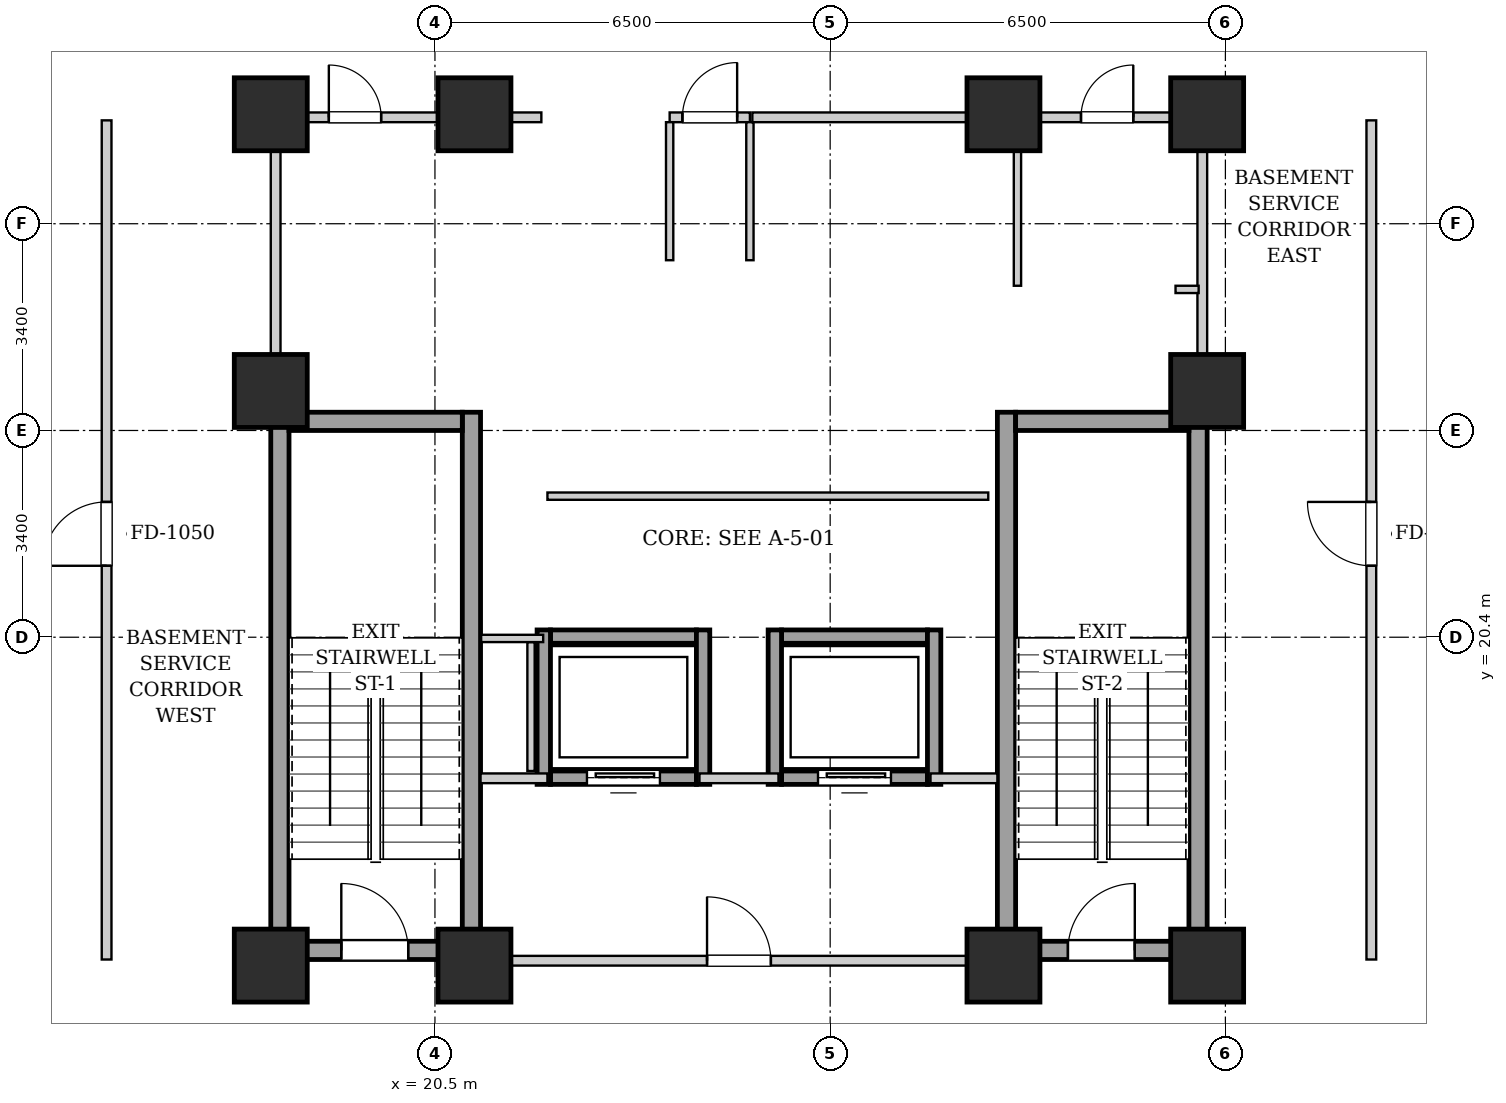
"""IFC4 building model, lengths in metres.
Left out: names, types, materials, properties, quantities, classifications, styles, units other than length and angle.
Written with IfcOpenShell. Run it as: python <this file> out.ifc"""

import sys

from ifc_helpers import new_model, si_unit, direction, frame, frame_2d, origin, origin_2d, place, context, subcontext, project, spatial, rectangle, extrude, element, fill, save


model = new_model("IFC4")
c1 = context("Model", 3, precision=1e-05, world=origin(), true_north=direction((0.0, 1.0)))
c2 = subcontext(c1, "Body", "Model", "MODEL_VIEW")
j1 = project(units=[si_unit("LENGTHUNIT", "METRE"), si_unit("PLANEANGLEUNIT", "RADIAN")], contexts=[c1])
p1 = place(None, origin())
s1 = spatial("IfcSite", under=j1, at=p1, CompositionType="ELEMENT")
p2 = place(p1, origin())
s2 = spatial("IfcBuilding", under=s1, at=p2, CompositionType="ELEMENT")
p3 = place(p2, frame((0.0, 0.0, -9.6)))
s3 = spatial("IfcBuildingStorey", under=s2, at=p3, CompositionType="ELEMENT", Elevation=-9.6)
for number, where, z_axis, x_axis in (
    (1, (17.8, 15.0, 0.0), (0.0, 0.0, 1.0), (1.0, 0.0, 0.0)),
    (2, (21.15, 15.0, 0.0), (0.0, 0.0, 1.0), (1.0, 0.0, 0.0)),
    (3, (29.85, 15.0, 0.0), (0.0, 0.0, 1.0), (1.0, 0.0, 0.0)),
    (4, (33.2, 15.0, 0.0), (0.0, 0.0, 1.0), (1.0, 0.0, 0.0)),
    (5, (17.8, 29.0, 0.0), (0.0, 0.0, 1.0), (1.0, 0.0, 0.0)),
    (6, (21.15, 29.0, 0.0), (0.0, 0.0, 1.0), (1.0, 0.0, 0.0)),
    (7, (29.85, 29.0, 0.0), (0.0, 0.0, 1.0), (1.0, 0.0, 0.0)),
    (8, (33.2, 29.0, 0.0), (0.0, 0.0, 1.0), (1.0, 0.0, 0.0)),
    (9, (17.8, 24.45, 0.0), (0.0, 0.0, 1.0), (1.0, 0.0, 0.0)),
    (10, (33.2, 24.45, 0.0), (0.0, 0.0, 1.0), (1.0, 0.0, 0.0)),
):
    element("IfcColumn", number, at=place(p3, frame(where, z_axis=z_axis, x_axis=x_axis)), inside=s3, PredefinedType="COLUMN", context=c2, shape_type="SweptSolid", body=[
        extrude(rectangle(XDim=1.2, YDim=1.2, at=origin_2d()), origin(), (0.0, 0.0, 1.0), 4.8),
    ])
for number, where, z_axis, x_axis in (
    (11, (17.95, 15.1, 0.0), (0.0, 0.0, 1.0), (0.0, 1.0, 0.0)),
    (12, (21.1, 15.1, 0.0), (0.0, 0.0, 1.0), (0.0, 1.0, 0.0)),
):
    element("IfcWall", number, at=place(p3, frame(where, z_axis=z_axis, x_axis=x_axis)), inside=s3, PredefinedType="SHEAR", context=c2, shape_type="SweptSolid", body=[
        extrude(rectangle(XDim=9.0, YDim=0.3, at=frame_2d((4.5, 0.0))), origin(), (0.0, 0.0, 1.0), 4.48),
    ])
p4 = place(p3, frame((18.1, 23.95, 0.0), z_axis=(0.0, 0.0, 1.0), x_axis=(1.0, 0.0, 0.0)))
e13 = element("IfcWall", 13, at=p4, inside=s3, PredefinedType="SHEAR", context=c2, shape_type="SweptSolid", body=[
    extrude(rectangle(XDim=2.85, YDim=0.3, at=frame_2d((1.425, 0.0))), origin(), (0.0, 0.0, 1.0), 4.48),
])
p5 = place(p3, frame((18.1, 15.25, 0.0), z_axis=(0.0, 0.0, 1.0), x_axis=(1.0, 0.0, 0.0)))
e14 = element("IfcWall", 14, at=p5, inside=s3, PredefinedType="SHEAR", context=c2, shape_type="SweptSolid", body=[
    extrude(rectangle(XDim=2.85, YDim=0.3, at=frame_2d((1.425, 0.0))), origin(), (0.0, 0.0, 1.0), 4.48),
])
p6 = place(p5, frame((0.86, 0.0, 0.0)))
e15 = element("IfcOpeningElement", 15, at=p6, cuts=e14, PredefinedType="OPENING", context=c2, shape_type="SweptSolid", body=[
    extrude(rectangle(XDim=1.1, YDim=2.05, at=frame_2d((0.55, 1.025))), frame((0.0, 0.16, 0.0), z_axis=(0.0, -1.0, 0.0), x_axis=(1.0, 0.0, 0.0)), (0.0, 0.0, 1.0), 0.32),
])
for number, where, z_axis, x_axis in (
    (16, (29.9, 15.1, 0.0), (0.0, 0.0, 1.0), (0.0, 1.0, 0.0)),
    (17, (33.05, 15.1, 0.0), (0.0, 0.0, 1.0), (0.0, 1.0, 0.0)),
):
    element("IfcWall", number, at=place(p3, frame(where, z_axis=z_axis, x_axis=x_axis)), inside=s3, PredefinedType="SHEAR", context=c2, shape_type="SweptSolid", body=[
        extrude(rectangle(XDim=9.0, YDim=0.3, at=frame_2d((4.5, 0.0))), origin(), (0.0, 0.0, 1.0), 4.48),
    ])
p7 = place(p3, frame((30.05, 23.95, 0.0), z_axis=(0.0, 0.0, 1.0), x_axis=(1.0, 0.0, 0.0)))
e18 = element("IfcWall", 18, at=p7, inside=s3, PredefinedType="SHEAR", context=c2, shape_type="SweptSolid", body=[
    extrude(rectangle(XDim=2.85, YDim=0.3, at=frame_2d((1.425, 0.0))), origin(), (0.0, 0.0, 1.0), 4.48),
])
p8 = place(p3, frame((30.05, 15.25, 0.0), z_axis=(0.0, 0.0, 1.0), x_axis=(1.0, 0.0, 0.0)))
e19 = element("IfcWall", 19, at=p8, inside=s3, PredefinedType="SHEAR", context=c2, shape_type="SweptSolid", body=[
    extrude(rectangle(XDim=2.85, YDim=0.3, at=frame_2d((1.425, 0.0))), origin(), (0.0, 0.0, 1.0), 4.48),
])
p9 = place(p8, frame((0.86, 0.0, 0.0)))
e20 = element("IfcOpeningElement", 20, at=p9, cuts=e19, PredefinedType="OPENING", context=c2, shape_type="SweptSolid", body=[
    extrude(rectangle(XDim=1.1, YDim=2.05, at=frame_2d((0.55, 1.025))), frame((0.0, 0.16, 0.0), z_axis=(0.0, -1.0, 0.0), x_axis=(1.0, 0.0, 0.0)), (0.0, 0.0, 1.0), 0.32),
])
p10 = place(p3, frame((22.4, 18.09, 0.0), z_axis=(0.0, 0.0, 1.0), x_axis=(1.0, 0.0, 0.0)))
e21 = element("IfcWall", 21, at=p10, inside=s3, PredefinedType="SHEAR", context=c2, shape_type="SweptSolid", body=[
    extrude(rectangle(XDim=2.4, YDim=0.22, at=frame_2d((1.2, 0.0))), origin(), (0.0, 0.0, 1.0), 4.48),
])
p11 = place(p10, frame((0.6, 0.0, 0.0)))
e22 = element("IfcOpeningElement", 22, at=p11, cuts=e21, PredefinedType="OPENING", context=c2, shape_type="SweptSolid", body=[
    extrude(rectangle(XDim=1.2, YDim=2.15, at=frame_2d((0.6, 1.075))), frame((0.0, 0.12, 0.0), z_axis=(0.0, -1.0, 0.0), x_axis=(1.0, 0.0, 0.0)), (0.0, 0.0, 1.0), 0.24),
])
p12 = place(p3, frame((22.4, 20.41, 0.0), z_axis=(0.0, 0.0, 1.0), x_axis=(1.0, 0.0, 0.0)))
e23 = element("IfcWall", 23, at=p12, inside=s3, PredefinedType="SHEAR", context=c2, shape_type="SweptSolid", body=[
    extrude(rectangle(XDim=2.4, YDim=0.22, at=frame_2d((1.2, 0.0))), origin(), (0.0, 0.0, 1.0), 4.48),
])
for number, where, z_axis, x_axis in (
    (24, (22.29, 17.98, 0.0), (0.0, 0.0, 1.0), (0.0, 1.0, 0.0)),
    (25, (24.91, 17.98, 0.0), (0.0, 0.0, 1.0), (0.0, 1.0, 0.0)),
):
    element("IfcWall", number, at=place(p3, frame(where, z_axis=z_axis, x_axis=x_axis)), inside=s3, PredefinedType="SHEAR", context=c2, shape_type="SweptSolid", body=[
        extrude(rectangle(XDim=2.54, YDim=0.22, at=frame_2d((1.27, 0.0))), origin(), (0.0, 0.0, 1.0), 4.48),
    ])
p13 = place(p3, frame((26.2, 18.09, 0.0), z_axis=(0.0, 0.0, 1.0), x_axis=(1.0, 0.0, 0.0)))
e26 = element("IfcWall", 26, at=p13, inside=s3, PredefinedType="SHEAR", context=c2, shape_type="SweptSolid", body=[
    extrude(rectangle(XDim=2.4, YDim=0.22, at=frame_2d((1.2, 0.0))), origin(), (0.0, 0.0, 1.0), 4.48),
])
p14 = place(p13, frame((0.6, 0.0, 0.0)))
e27 = element("IfcOpeningElement", 27, at=p14, cuts=e26, PredefinedType="OPENING", context=c2, shape_type="SweptSolid", body=[
    extrude(rectangle(XDim=1.2, YDim=2.15, at=frame_2d((0.6, 1.075))), frame((0.0, 0.12, 0.0), z_axis=(0.0, -1.0, 0.0), x_axis=(1.0, 0.0, 0.0)), (0.0, 0.0, 1.0), 0.24),
])
p15 = place(p3, frame((26.2, 20.41, 0.0), z_axis=(0.0, 0.0, 1.0), x_axis=(1.0, 0.0, 0.0)))
e28 = element("IfcWall", 28, at=p15, inside=s3, PredefinedType="SHEAR", context=c2, shape_type="SweptSolid", body=[
    extrude(rectangle(XDim=2.4, YDim=0.22, at=frame_2d((1.2, 0.0))), origin(), (0.0, 0.0, 1.0), 4.48),
])
for number, where, z_axis, x_axis in (
    (29, (26.09, 17.98, 0.0), (0.0, 0.0, 1.0), (0.0, 1.0, 0.0)),
    (30, (28.71, 17.98, 0.0), (0.0, 0.0, 1.0), (0.0, 1.0, 0.0)),
):
    element("IfcWall", number, at=place(p3, frame(where, z_axis=z_axis, x_axis=x_axis)), inside=s3, PredefinedType="SHEAR", context=c2, shape_type="SweptSolid", body=[
        extrude(rectangle(XDim=2.54, YDim=0.22, at=frame_2d((1.27, 0.0))), origin(), (0.0, 0.0, 1.0), 4.48),
    ])
p16 = place(p3, frame((21.25, 15.08, 0.0), z_axis=(0.0, 0.0, 1.0), x_axis=(1.0, 0.0, 0.0)))
e31 = element("IfcWall", 31, at=p16, inside=s3, PredefinedType="PARTITIONING", context=c2, shape_type="SweptSolid", body=[
    extrude(rectangle(XDim=8.5, YDim=0.16, at=frame_2d((4.25, 0.0))), origin(), (0.0, 0.0, 1.0), 4.48),
])
p17 = place(p16, frame((3.725, 0.0, 0.0)))
e32 = element("IfcOpeningElement", 32, at=p17, cuts=e31, PredefinedType="OPENING", context=c2, shape_type="SweptSolid", body=[
    extrude(rectangle(XDim=1.05, YDim=2.05, at=frame_2d((0.525, 1.025))), frame((0.0, 0.09, 0.0), z_axis=(0.0, -1.0, 0.0), x_axis=(1.0, 0.0, 0.0)), (0.0, 0.0, 1.0), 0.18),
])
p18 = place(p3, frame((21.25, 18.08, 0.0), z_axis=(0.0, 0.0, 1.0), x_axis=(1.0, 0.0, 0.0)))
e33 = element("IfcWall", 33, at=p18, inside=s3, PredefinedType="PARTITIONING", context=c2, shape_type="SweptSolid", body=[
    extrude(rectangle(XDim=1.1, YDim=0.16, at=frame_2d((0.55, 0.0))), origin(), (0.0, 0.0, 1.0), 4.48),
])
p19 = place(p3, frame((24.85, 18.08, 0.0), z_axis=(0.0, 0.0, 1.0), x_axis=(1.0, 0.0, 0.0)))
e34 = element("IfcWall", 34, at=p19, inside=s3, PredefinedType="PARTITIONING", context=c2, shape_type="SweptSolid", body=[
    extrude(rectangle(XDim=1.3, YDim=0.16, at=frame_2d((0.65, 0.0))), origin(), (0.0, 0.0, 1.0), 4.48),
])
p20 = place(p3, frame((28.65, 18.08, 0.0), z_axis=(0.0, 0.0, 1.0), x_axis=(1.0, 0.0, 0.0)))
e35 = element("IfcWall", 35, at=p20, inside=s3, PredefinedType="PARTITIONING", context=c2, shape_type="SweptSolid", body=[
    extrude(rectangle(XDim=1.1, YDim=0.16, at=frame_2d((0.55, 0.0))), origin(), (0.0, 0.0, 1.0), 4.48),
])
for number, where, z_axis, x_axis in (
    (36, (17.88, 24.12, 0.0), (0.0, 0.0, 1.0), (0.0, 1.0, 0.0)),
    (37, (33.12, 24.12, 0.0), (0.0, 0.0, 1.0), (0.0, 1.0, 0.0)),
):
    element("IfcWall", number, at=place(p3, frame(where, z_axis=z_axis, x_axis=x_axis)), inside=s3, PredefinedType="PARTITIONING", context=c2, shape_type="SweptSolid", body=[
        extrude(rectangle(XDim=4.76, YDim=0.16, at=frame_2d((2.38, 0.0))), origin(), (0.0, 0.0, 1.0), 4.48),
    ])
p21 = place(p3, frame((24.36, 28.95, 0.0), z_axis=(0.0, 0.0, 1.0), x_axis=(1.0, 0.0, 0.0)))
e38 = element("IfcWall", 38, at=p21, inside=s3, PredefinedType="PARTITIONING", context=c2, shape_type="SweptSolid", body=[
    extrude(rectangle(XDim=1.32, YDim=0.16, at=frame_2d((0.66, 0.0))), origin(), (0.0, 0.0, 1.0), 4.48),
])
p22 = place(p21, frame((0.21, 0.0, 0.0)))
e39 = element("IfcOpeningElement", 39, at=p22, cuts=e38, PredefinedType="OPENING", context=c2, shape_type="SweptSolid", body=[
    extrude(rectangle(XDim=0.9, YDim=2.05, at=frame_2d((0.45, 1.025))), frame((0.0, 0.09, 0.0), z_axis=(0.0, -1.0, 0.0), x_axis=(1.0, 0.0, 0.0)), (0.0, 0.0, 1.0), 0.18),
])
p23 = place(p3, frame((17.96, 28.95, 0.0), z_axis=(0.0, 0.0, 1.0), x_axis=(1.0, 0.0, 0.0)))
e40 = element("IfcWall", 40, at=p23, inside=s3, PredefinedType="PARTITIONING", context=c2, shape_type="SweptSolid", body=[
    extrude(rectangle(XDim=4.29, YDim=0.16, at=frame_2d((2.145, 0.0))), origin(), (0.0, 0.0, 1.0), 4.48),
])
p24 = place(p23, frame((0.795, 0.0, 0.0)))
e41 = element("IfcOpeningElement", 41, at=p24, cuts=e40, PredefinedType="OPENING", context=c2, shape_type="SweptSolid", body=[
    extrude(rectangle(XDim=0.86, YDim=2.05, at=frame_2d((0.43, 1.025))), frame((0.0, 0.09, 0.0), z_axis=(0.0, -1.0, 0.0), x_axis=(1.0, 0.0, 0.0)), (0.0, 0.0, 1.0), 0.18),
])
p25 = place(p3, frame((22.08, 18.2, 0.0), z_axis=(0.0, 0.0, 1.0), x_axis=(0.0, 1.0, 0.0)))
e42 = element("IfcWall", 42, at=p25, inside=s3, PredefinedType="PARTITIONING", context=c2, shape_type="SweptSolid", body=[
    extrude(rectangle(XDim=2.12, YDim=0.12, at=frame_2d((1.06, 0.0))), origin(), (0.0, 0.0, 1.0), 4.48),
])
p26 = place(p3, frame((22.28, 20.38, 0.0), z_axis=(0.0, 0.0, 1.0), x_axis=(-1.0, 0.0, 0.0)))
e43 = element("IfcWall", 43, at=p26, inside=s3, PredefinedType="PARTITIONING", context=c2, shape_type="SweptSolid", body=[
    extrude(rectangle(XDim=1.02, YDim=0.12, at=frame_2d((0.51, 0.0))), origin(), (0.0, 0.0, 1.0), 4.48),
])
for number, where, z_axis, x_axis in (
    (44, (24.36, 26.6, 0.0), (0.0, 0.0, 1.0), (0.0, 1.0, 0.0)),
    (45, (25.68, 26.6, 0.0), (0.0, 0.0, 1.0), (0.0, 1.0, 0.0)),
):
    element("IfcWall", number, at=place(p3, frame(where, z_axis=z_axis, x_axis=x_axis)), inside=s3, PredefinedType="PARTITIONING", context=c2, shape_type="SweptSolid", body=[
        extrude(rectangle(XDim=2.27, YDim=0.12, at=frame_2d((1.135, 0.0))), origin(), (0.0, 0.0, 1.0), 4.48),
    ])
p27 = place(p3, frame((30.08, 26.18, 0.0), z_axis=(0.0, 0.0, 1.0), x_axis=(0.0, 1.0, 0.0)))
e46 = element("IfcWall", 46, at=p27, inside=s3, PredefinedType="PARTITIONING", context=c2, shape_type="SweptSolid", body=[
    extrude(rectangle(XDim=2.68, YDim=0.12, at=frame_2d((1.34, 0.0))), origin(), (0.0, 0.0, 1.0), 4.48),
])
p28 = place(p3, frame((32.68, 26.12, 0.0), z_axis=(0.0, 0.0, 1.0), x_axis=(1.0, 0.0, 0.0)))
e47 = element("IfcWall", 47, at=p28, inside=s3, PredefinedType="PARTITIONING", context=c2, shape_type="SweptSolid", body=[
    extrude(rectangle(XDim=0.38, YDim=0.12, at=frame_2d((0.19, 0.0))), origin(), (0.0, 0.0, 1.0), 4.48),
])
p29 = place(p3, frame((30.08, 28.95, 0.0), z_axis=(0.0, 0.0, 1.0), x_axis=(1.0, 0.0, 0.0)))
e48 = element("IfcWall", 48, at=p29, inside=s3, PredefinedType="PARTITIONING", context=c2, shape_type="SweptSolid", body=[
    extrude(rectangle(XDim=2.96, YDim=0.16, at=frame_2d((1.48, 0.0))), origin(), (0.0, 0.0, 1.0), 4.48),
])
p30 = place(p29, frame((1.045, 0.0, 0.0)))
e49 = element("IfcOpeningElement", 49, at=p30, cuts=e48, PredefinedType="OPENING", context=c2, shape_type="SweptSolid", body=[
    extrude(rectangle(XDim=0.86, YDim=2.05, at=frame_2d((0.43, 1.025))), frame((0.0, 0.09, 0.0), z_axis=(0.0, -1.0, 0.0), x_axis=(1.0, 0.0, 0.0)), (0.0, 0.0, 1.0), 0.18),
])
p31 = place(p3, frame((25.72, 28.95, 0.0), z_axis=(0.0, 0.0, 1.0), x_axis=(1.0, 0.0, 0.0)))
e50 = element("IfcWall", 50, at=p31, inside=s3, PredefinedType="PARTITIONING", context=c2, shape_type="SweptSolid", body=[
    extrude(rectangle(XDim=4.3, YDim=0.16, at=frame_2d((2.15, 0.0))), origin(), (0.0, 0.0, 1.0), 4.48),
])
p32 = place(p3, frame((22.35, 22.72, 0.0), z_axis=(0.0, 0.0, 1.0), x_axis=(1.0, 0.0, 0.0)))
e51 = element("IfcWall", 51, at=p32, inside=s3, PredefinedType="PARTITIONING", context=c2, shape_type="SweptSolid", body=[
    extrude(rectangle(XDim=7.25, YDim=0.12, at=frame_2d((3.625, 0.0))), origin(), (0.0, 0.0, 1.0), 4.48),
])
p33 = place(p3, frame((15.1, 15.1, 0.0), z_axis=(0.0, 0.0, 1.0), x_axis=(0.0, 1.0, 0.0)))
e52 = element("IfcWall", 52, at=p33, inside=s3, PredefinedType="PARTITIONING", context=c2, shape_type="SweptSolid", body=[
    extrude(rectangle(XDim=13.8, YDim=0.16, at=frame_2d((6.9, 0.0))), origin(), (0.0, 0.0, 1.0), 4.48),
])
p34 = place(p33, frame((6.475, 0.0, 0.0)))
e53 = element("IfcOpeningElement", 53, at=p34, cuts=e52, PredefinedType="OPENING", context=c2, shape_type="SweptSolid", body=[
    extrude(rectangle(XDim=1.05, YDim=2.05, at=frame_2d((0.525, 1.025))), frame((0.0, 0.09, 0.0), z_axis=(0.0, -1.0, 0.0), x_axis=(1.0, 0.0, 0.0)), (0.0, 0.0, 1.0), 0.18),
])
p35 = place(p3, frame((35.9, 15.1, 0.0), z_axis=(0.0, 0.0, 1.0), x_axis=(0.0, 1.0, 0.0)))
e54 = element("IfcWall", 54, at=p35, inside=s3, PredefinedType="PARTITIONING", context=c2, shape_type="SweptSolid", body=[
    extrude(rectangle(XDim=13.8, YDim=0.16, at=frame_2d((6.9, 0.0))), origin(), (0.0, 0.0, 1.0), 4.48),
])
p36 = place(p35, frame((6.475, 0.0, 0.0)))
e55 = element("IfcOpeningElement", 55, at=p36, cuts=e54, PredefinedType="OPENING", context=c2, shape_type="SweptSolid", body=[
    extrude(rectangle(XDim=1.05, YDim=2.05, at=frame_2d((0.525, 1.025))), frame((0.0, 0.09, 0.0), z_axis=(0.0, -1.0, 0.0), x_axis=(1.0, 0.0, 0.0)), (0.0, 0.0, 1.0), 0.18),
])
p37 = place(p6, origin())
e56 = element("IfcDoor", 56, at=p37, inside=s3, OperationType="SINGLE_SWING_LEFT", PredefinedType="DOOR", context=c2, shape_type="SweptSolid", body=[
    extrude(rectangle(XDim=1.1, YDim=2.05, at=frame_2d((0.55, 1.025))), frame((0.0, 0.025, 0.0), z_axis=(0.0, -1.0, 0.0), x_axis=(1.0, 0.0, 0.0)), (0.0, 0.0, 1.0), 0.05),
])
fill(e15, e56)
p38 = place(p9, origin())
e57 = element("IfcDoor", 57, at=p38, inside=s3, OperationType="SINGLE_SWING_RIGHT", PredefinedType="DOOR", context=c2, shape_type="SweptSolid", body=[
    extrude(rectangle(XDim=1.1, YDim=2.05, at=frame_2d((0.55, 1.025))), frame((0.0, 0.025, 0.0), z_axis=(0.0, -1.0, 0.0), x_axis=(1.0, 0.0, 0.0)), (0.0, 0.0, 1.0), 0.05),
])
fill(e20, e57)
p39 = place(p11, origin())
e58 = element("IfcDoor", 58, at=p39, inside=s3, OperationType="SLIDING_TO_LEFT", PredefinedType="DOOR", context=c2, shape_type="SweptSolid", body=[
    extrude(rectangle(XDim=1.2, YDim=2.15, at=frame_2d((0.6, 1.075))), frame((0.0, 0.025, 0.0), z_axis=(0.0, -1.0, 0.0), x_axis=(1.0, 0.0, 0.0)), (0.0, 0.0, 1.0), 0.05),
])
fill(e22, e58)
p40 = place(p14, origin())
e59 = element("IfcDoor", 59, at=p40, inside=s3, OperationType="SLIDING_TO_LEFT", PredefinedType="DOOR", context=c2, shape_type="SweptSolid", body=[
    extrude(rectangle(XDim=1.2, YDim=2.15, at=frame_2d((0.6, 1.075))), frame((0.0, 0.025, 0.0), z_axis=(0.0, -1.0, 0.0), x_axis=(1.0, 0.0, 0.0)), (0.0, 0.0, 1.0), 0.05),
])
fill(e27, e59)
p41 = place(p17, origin())
e60 = element("IfcDoor", 60, at=p41, inside=s3, OperationType="SINGLE_SWING_LEFT", PredefinedType="DOOR", context=c2, shape_type="SweptSolid", body=[
    extrude(rectangle(XDim=1.05, YDim=2.05, at=frame_2d((0.525, 1.025))), frame((0.0, 0.025, 0.0), z_axis=(0.0, -1.0, 0.0), x_axis=(1.0, 0.0, 0.0)), (0.0, 0.0, 1.0), 0.05),
])
fill(e32, e60)
p42 = place(p22, origin())
e61 = element("IfcDoor", 61, at=p42, inside=s3, OperationType="SINGLE_SWING_RIGHT", PredefinedType="DOOR", context=c2, shape_type="SweptSolid", body=[
    extrude(rectangle(XDim=0.9, YDim=2.05, at=frame_2d((0.45, 1.025))), frame((0.0, 0.025, 0.0), z_axis=(0.0, -1.0, 0.0), x_axis=(1.0, 0.0, 0.0)), (0.0, 0.0, 1.0), 0.05),
])
fill(e39, e61)
p43 = place(p24, origin())
e62 = element("IfcDoor", 62, at=p43, inside=s3, OperationType="SINGLE_SWING_LEFT", PredefinedType="DOOR", context=c2, shape_type="SweptSolid", body=[
    extrude(rectangle(XDim=0.86, YDim=2.05, at=frame_2d((0.43, 1.025))), frame((0.0, 0.025, 0.0), z_axis=(0.0, -1.0, 0.0), x_axis=(1.0, 0.0, 0.0)), (0.0, 0.0, 1.0), 0.05),
])
fill(e41, e62)
p44 = place(p30, origin())
e63 = element("IfcDoor", 63, at=p44, inside=s3, OperationType="SINGLE_SWING_RIGHT", PredefinedType="DOOR", context=c2, shape_type="SweptSolid", body=[
    extrude(rectangle(XDim=0.86, YDim=2.05, at=frame_2d((0.43, 1.025))), frame((0.0, 0.025, 0.0), z_axis=(0.0, -1.0, 0.0), x_axis=(1.0, 0.0, 0.0)), (0.0, 0.0, 1.0), 0.05),
])
fill(e49, e63)
p45 = place(p34, origin())
e64 = element("IfcDoor", 64, at=p45, inside=s3, OperationType="SINGLE_SWING_LEFT", PredefinedType="DOOR", context=c2, shape_type="SweptSolid", body=[
    extrude(rectangle(XDim=1.05, YDim=2.05, at=frame_2d((0.525, 1.025))), frame((0.0, 0.025, 0.0), z_axis=(0.0, -1.0, 0.0), x_axis=(1.0, 0.0, 0.0)), (0.0, 0.0, 1.0), 0.05),
])
fill(e53, e64)
p46 = place(p36, origin())
e65 = element("IfcDoor", 65, at=p46, inside=s3, OperationType="SINGLE_SWING_RIGHT", PredefinedType="DOOR", context=c2, shape_type="SweptSolid", body=[
    extrude(rectangle(XDim=1.05, YDim=2.05, at=frame_2d((0.525, 1.025))), frame((0.0, 0.025, 0.0), z_axis=(0.0, -1.0, 0.0), x_axis=(1.0, 0.0, 0.0)), (0.0, 0.0, 1.0), 0.05),
])
fill(e55, e65)
save(model, sys.argv[1])
